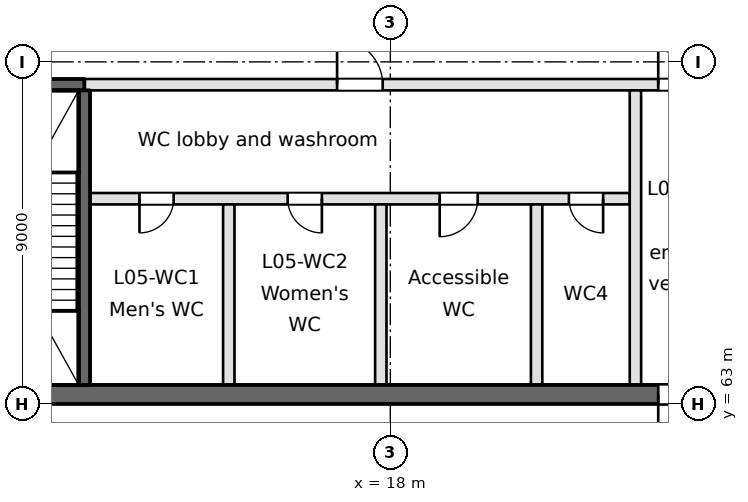
"""IFC4 building model, lengths in metres.
Left out: names, types, materials, properties, quantities, classifications, styles, units other than length and angle.
Written with IfcOpenShell. Run it as: python <this file> out.ifc"""

import sys

from ifc_helpers import new_model, si_unit, direction, frame, frame_2d, origin, place, context, subcontext, project, spatial, rectangle, extrude, element, fill, save


model = new_model("IFC4")
c1 = context("Model", 3, precision=1e-05, world=origin(), true_north=direction((0.0, 1.0)))
c2 = subcontext(c1, "Body", "Model", "MODEL_VIEW")
j1 = project(units=[si_unit("LENGTHUNIT", "METRE"), si_unit("PLANEANGLEUNIT", "RADIAN")], contexts=[c1])
p1 = place(None, origin())
s1 = spatial("IfcSite", under=j1, at=p1, CompositionType="ELEMENT")
p2 = place(p1, origin())
s2 = spatial("IfcBuilding", under=s1, at=p2, CompositionType="ELEMENT")
p3 = place(p2, frame((0.0, 0.0, 26.4)))
s3 = spatial("IfcBuildingStorey", under=s2, at=p3, CompositionType="ELEMENT", Elevation=26.4)
p4 = place(p3, frame((0.9, 63.25, -0.35), z_axis=(0.0, 0.0, 1.0), x_axis=(1.0, 0.0, 0.0)))
e1 = element("IfcWall", 1, at=p4, inside=s3, PredefinedType="SOLIDWALL", context=c2, shape_type="SweptSolid", body=[
    extrude(rectangle(XDim=35.1, YDim=0.5, at=frame_2d((17.55, 0.0))), origin(), (0.0, 0.0, 1.0), 4.7),
])
p5 = place(p4, frame((24.15, 0.0, 0.35)))
e2 = element("IfcOpeningElement", 2, at=p5, cuts=e1, PredefinedType="OPENING", context=c2, shape_type="SweptSolid", body=[
    extrude(rectangle(XDim=1.8, YDim=2.1, at=frame_2d((0.9, 1.05))), frame((0.0, 0.25, 0.0), z_axis=(0.0, -1.0, 0.0), x_axis=(1.0, 0.0, 0.0)), (0.0, 0.0, 1.0), 0.5),
])
p6 = place(p4, frame((1.55, 0.0, 0.35)))
e3 = element("IfcOpeningElement", 3, at=p6, cuts=e1, PredefinedType="OPENING", context=c2, shape_type="SweptSolid", body=[
    extrude(rectangle(XDim=1.2, YDim=2.1, at=frame_2d((0.6, 1.05))), frame((0.0, 0.25, 0.0), z_axis=(0.0, -1.0, 0.0), x_axis=(1.0, 0.0, 0.0)), (0.0, 0.0, 1.0), 0.5),
])
p7 = place(p4, frame((6.15, 0.0, 0.35)))
e4 = element("IfcOpeningElement", 4, at=p7, cuts=e1, PredefinedType="OPENING", context=c2, shape_type="SweptSolid", body=[
    extrude(rectangle(XDim=1.2, YDim=2.1, at=frame_2d((0.6, 1.05))), frame((0.0, 0.25, 0.0), z_axis=(0.0, -1.0, 0.0), x_axis=(1.0, 0.0, 0.0)), (0.0, 0.0, 1.0), 0.5),
])
p8 = place(p3, frame((10.1, 68.4, 0.0), z_axis=(0.0, 0.0, 1.0), x_axis=(1.0, 0.0, 0.0)))
e5 = element("IfcWall", 5, at=p8, inside=s3, PredefinedType="PARTITIONING", context=c2, shape_type="SweptSolid", body=[
    extrude(rectangle(XDim=14.2, YDim=0.3, at=frame_2d((7.1, 0.0))), origin(), (0.0, 0.0, 1.0), 4.35),
])
p9 = place(p8, frame((1.3, 0.0, 0.0)))
e6 = element("IfcOpeningElement", 6, at=p9, cuts=e5, PredefinedType="OPENING", context=c2, shape_type="SweptSolid", body=[
    extrude(rectangle(XDim=0.9, YDim=2.1, at=frame_2d((0.45, 1.05))), frame((0.0, 0.15, 0.0), z_axis=(0.0, -1.0, 0.0), x_axis=(1.0, 0.0, 0.0)), (0.0, 0.0, 1.0), 0.3),
])
p10 = place(p8, frame((5.2, 0.0, 0.0)))
e7 = element("IfcOpeningElement", 7, at=p10, cuts=e5, PredefinedType="OPENING", context=c2, shape_type="SweptSolid", body=[
    extrude(rectangle(XDim=0.9, YDim=2.1, at=frame_2d((0.45, 1.05))), frame((0.0, 0.15, 0.0), z_axis=(0.0, -1.0, 0.0), x_axis=(1.0, 0.0, 0.0)), (0.0, 0.0, 1.0), 0.3),
])
p11 = place(p8, frame((9.2, 0.0, 0.0)))
e8 = element("IfcOpeningElement", 8, at=p11, cuts=e5, PredefinedType="OPENING", context=c2, shape_type="SweptSolid", body=[
    extrude(rectangle(XDim=1.0, YDim=2.1, at=frame_2d((0.5, 1.05))), frame((0.0, 0.15, 0.0), z_axis=(0.0, -1.0, 0.0), x_axis=(1.0, 0.0, 0.0)), (0.0, 0.0, 1.0), 0.3),
])
p12 = place(p8, frame((12.6, 0.0, 0.0)))
e9 = element("IfcOpeningElement", 9, at=p12, cuts=e5, PredefinedType="OPENING", context=c2, shape_type="SweptSolid", body=[
    extrude(rectangle(XDim=0.9, YDim=2.1, at=frame_2d((0.45, 1.05))), frame((0.0, 0.15, 0.0), z_axis=(0.0, -1.0, 0.0), x_axis=(1.0, 0.0, 0.0)), (0.0, 0.0, 1.0), 0.3),
])
p13 = place(p3, frame((0.9, 71.4, -0.35), z_axis=(0.0, 0.0, 1.0), x_axis=(1.0, 0.0, 0.0)))
e10 = element("IfcWall", 10, at=p13, inside=s3, PredefinedType="SOLIDWALL", context=c2, shape_type="SweptSolid", body=[
    extrude(rectangle(XDim=9.05, YDim=0.3, at=frame_2d((4.525, 0.0))), origin(), (0.0, 0.0, 1.0), 4.7),
])
p14 = place(p3, frame((9.95, 71.4, 0.0), z_axis=(0.0, 0.0, 1.0), x_axis=(1.0, 0.0, 0.0)))
e11 = element("IfcWall", 11, at=p14, inside=s3, PredefinedType="PARTITIONING", context=c2, shape_type="SweptSolid", body=[
    extrude(rectangle(XDim=17.65, YDim=0.3, at=frame_2d((8.825, 0.0))), origin(), (0.0, 0.0, 1.0), 4.35),
])
p15 = place(p14, frame((15.1, 0.0, 0.0)))
e12 = element("IfcOpeningElement", 12, at=p15, cuts=e11, PredefinedType="OPENING", context=c2, shape_type="SweptSolid", body=[
    extrude(rectangle(XDim=1.8, YDim=2.1, at=frame_2d((0.9, 1.05))), frame((0.0, 0.15, 0.0), z_axis=(0.0, -1.0, 0.0), x_axis=(1.0, 0.0, 0.0)), (0.0, 0.0, 1.0), 0.3),
])
p16 = place(p14, frame((6.65, 0.0, 0.0)))
e13 = element("IfcOpeningElement", 13, at=p16, cuts=e11, PredefinedType="OPENING", context=c2, shape_type="SweptSolid", body=[
    extrude(rectangle(XDim=1.2, YDim=2.1, at=frame_2d((0.6, 1.05))), frame((0.0, 0.15, 0.0), z_axis=(0.0, -1.0, 0.0), x_axis=(1.0, 0.0, 0.0)), (0.0, 0.0, 1.0), 0.3),
])
p17 = place(p3, frame((9.95, 63.5, -0.35), z_axis=(0.0, 0.0, 1.0), x_axis=(0.0, 1.0, 0.0)))
e14 = element("IfcWall", 14, at=p17, inside=s3, PredefinedType="SOLIDWALL", context=c2, shape_type="SweptSolid", body=[
    extrude(rectangle(XDim=7.75, YDim=0.3, at=frame_2d((3.875, 0.0))), origin(), (0.0, 0.0, 1.0), 4.7),
])
for number, where, z_axis, x_axis in (
    (15, (13.75, 63.5, 0.0), (0.0, 0.0, 1.0), (0.0, 1.0, 0.0)),
    (16, (17.75, 63.5, 0.0), (0.0, 0.0, 1.0), (0.0, 1.0, 0.0)),
    (17, (21.85, 63.5, 0.0), (0.0, 0.0, 1.0), (0.0, 1.0, 0.0)),
):
    element("IfcWall", number, at=place(p3, frame(where, z_axis=z_axis, x_axis=x_axis)), inside=s3, PredefinedType="PARTITIONING", context=c2, shape_type="SweptSolid", body=[
        extrude(rectangle(XDim=4.75, YDim=0.3, at=frame_2d((2.375, 0.0))), origin(), (0.0, 0.0, 1.0), 4.35),
    ])
p18 = place(p3, frame((24.45, 63.5, 0.0), z_axis=(0.0, 0.0, 1.0), x_axis=(0.0, 1.0, 0.0)))
e18 = element("IfcWall", 18, at=p18, inside=s3, PredefinedType="PARTITIONING", context=c2, shape_type="SweptSolid", body=[
    extrude(rectangle(XDim=7.75, YDim=0.3, at=frame_2d((3.875, 0.0))), origin(), (0.0, 0.0, 1.0), 4.35),
])
p19 = place(p5, frame((1.8, 0.0, 0.0), z_axis=(0.0, 0.0, 1.0), x_axis=(-1.0, 0.0, 0.0)))
e19 = element("IfcDoor", 19, at=p19, inside=s3, OperationType="DOUBLE_DOOR_SINGLE_SWING", PredefinedType="DOOR", context=c2, shape_type="SweptSolid", body=[
    extrude(rectangle(XDim=1.8, YDim=2.1, at=frame_2d((0.9, 1.05))), frame((0.0, 0.025, 0.0), z_axis=(0.0, -1.0, 0.0), x_axis=(1.0, 0.0, 0.0)), (0.0, 0.0, 1.0), 0.05),
])
fill(e2, e19)
p20 = place(p15, origin())
e20 = element("IfcDoor", 20, at=p20, inside=s3, OperationType="DOUBLE_DOOR_SINGLE_SWING", PredefinedType="DOOR", context=c2, shape_type="SweptSolid", body=[
    extrude(rectangle(XDim=1.8, YDim=2.1, at=frame_2d((0.9, 1.05))), frame((0.0, 0.025, 0.0), z_axis=(0.0, -1.0, 0.0), x_axis=(1.0, 0.0, 0.0)), (0.0, 0.0, 1.0), 0.05),
])
fill(e12, e20)
p21 = place(p9, frame((0.9, 0.0, 0.0), z_axis=(0.0, 0.0, 1.0), x_axis=(-1.0, 0.0, 0.0)))
e21 = element("IfcDoor", 21, at=p21, inside=s3, OperationType="SINGLE_SWING_RIGHT", PredefinedType="DOOR", context=c2, shape_type="SweptSolid", body=[
    extrude(rectangle(XDim=0.9, YDim=2.1, at=frame_2d((0.45, 1.05))), frame((0.0, 0.025, 0.0), z_axis=(0.0, -1.0, 0.0), x_axis=(1.0, 0.0, 0.0)), (0.0, 0.0, 1.0), 0.05),
])
fill(e6, e21)
p22 = place(p10, frame((0.9, 0.0, 0.0), z_axis=(0.0, 0.0, 1.0), x_axis=(-1.0, 0.0, 0.0)))
e22 = element("IfcDoor", 22, at=p22, inside=s3, OperationType="SINGLE_SWING_LEFT", PredefinedType="DOOR", context=c2, shape_type="SweptSolid", body=[
    extrude(rectangle(XDim=0.9, YDim=2.1, at=frame_2d((0.45, 1.05))), frame((0.0, 0.025, 0.0), z_axis=(0.0, -1.0, 0.0), x_axis=(1.0, 0.0, 0.0)), (0.0, 0.0, 1.0), 0.05),
])
fill(e7, e22)
p23 = place(p11, frame((1.0, 0.0, 0.0), z_axis=(0.0, 0.0, 1.0), x_axis=(-1.0, 0.0, 0.0)))
e23 = element("IfcDoor", 23, at=p23, inside=s3, OperationType="SINGLE_SWING_RIGHT", PredefinedType="DOOR", context=c2, shape_type="SweptSolid", body=[
    extrude(rectangle(XDim=1.0, YDim=2.1, at=frame_2d((0.5, 1.05))), frame((0.0, 0.025, 0.0), z_axis=(0.0, -1.0, 0.0), x_axis=(1.0, 0.0, 0.0)), (0.0, 0.0, 1.0), 0.05),
])
fill(e8, e23)
p24 = place(p12, frame((0.9, 0.0, 0.0), z_axis=(0.0, 0.0, 1.0), x_axis=(-1.0, 0.0, 0.0)))
e24 = element("IfcDoor", 24, at=p24, inside=s3, OperationType="SINGLE_SWING_LEFT", PredefinedType="DOOR", context=c2, shape_type="SweptSolid", body=[
    extrude(rectangle(XDim=0.9, YDim=2.1, at=frame_2d((0.45, 1.05))), frame((0.0, 0.025, 0.0), z_axis=(0.0, -1.0, 0.0), x_axis=(1.0, 0.0, 0.0)), (0.0, 0.0, 1.0), 0.05),
])
fill(e9, e24)
p25 = place(p16, origin())
e25 = element("IfcDoor", 25, at=p25, inside=s3, OperationType="SINGLE_SWING_LEFT", PredefinedType="DOOR", context=c2, shape_type="SweptSolid", body=[
    extrude(rectangle(XDim=1.2, YDim=2.1, at=frame_2d((0.6, 1.05))), frame((0.0, 0.025, 0.0), z_axis=(0.0, -1.0, 0.0), x_axis=(1.0, 0.0, 0.0)), (0.0, 0.0, 1.0), 0.05),
])
fill(e13, e25)
save(model, sys.argv[1])
